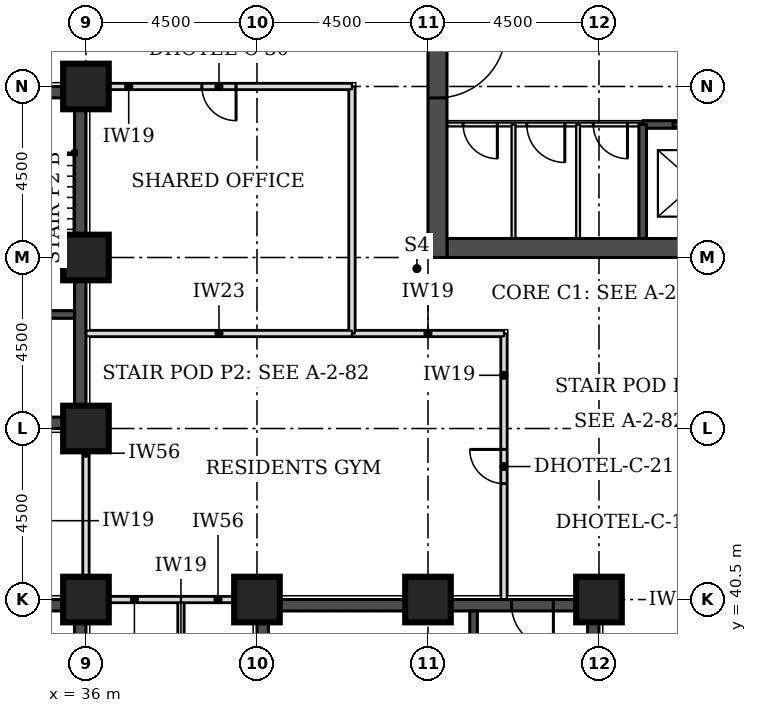
"""IFC4 building model, lengths in metres.
Left out: names, types, materials, properties, quantities, classifications, styles, units other than length and angle.
Written with IfcOpenShell. Run it as: python <this file> out.ifc"""

import sys

from ifc_helpers import new_model, si_unit, direction, frame, frame_2d, origin, origin_2d, place, context, subcontext, project, spatial, rectangle, extrude, element, fill, save


model = new_model("IFC4")
c1 = context("Model", 3, precision=1e-05, world=origin(), true_north=direction((0.0, 1.0)))
c2 = subcontext(c1, "Body", "Model", "MODEL_VIEW")
j1 = project(units=[si_unit("LENGTHUNIT", "METRE"), si_unit("PLANEANGLEUNIT", "RADIAN")], contexts=[c1])
p1 = place(None, origin())
s1 = spatial("IfcSite", under=j1, at=p1, CompositionType="ELEMENT")
p2 = place(p1, origin())
s2 = spatial("IfcBuilding", under=s1, at=p2, CompositionType="ELEMENT")
p3 = place(p2, frame((0.0, 0.0, 56.1)))
s3 = spatial("IfcBuildingStorey", under=s2, at=p3, CompositionType="ELEMENT", Elevation=56.1)
for number, where, z_axis, x_axis in (
    (1, (36.0, 40.5, 0.0), (0.0, 0.0, 1.0), (1.0, 0.0, 0.0)),
    (2, (40.5, 40.5, 0.0), (0.0, 0.0, 1.0), (1.0, 0.0, 0.0)),
    (3, (45.0, 40.5, 0.0), (0.0, 0.0, 1.0), (1.0, 0.0, 0.0)),
    (4, (49.5, 40.5, 0.0), (0.0, 0.0, 1.0), (1.0, 0.0, 0.0)),
    (5, (36.0, 45.0, 0.0), (0.0, 0.0, 1.0), (1.0, 0.0, 0.0)),
    (6, (36.0, 49.5, 0.0), (0.0, 0.0, 1.0), (1.0, 0.0, 0.0)),
    (7, (36.0, 54.0, 0.0), (0.0, 0.0, 1.0), (1.0, 0.0, 0.0)),
):
    element("IfcColumn", number, at=place(p3, frame(where, z_axis=z_axis, x_axis=x_axis)), inside=s3, PredefinedType="COLUMN", context=c2, shape_type="SweptSolid", body=[
        extrude(rectangle(XDim=1.2, YDim=1.2, at=origin_2d()), origin(), (0.0, 0.0, 1.0), 3.3),
    ])
p4 = place(p3, frame((45.5, 49.75, 0.0), z_axis=(0.0, 0.0, 1.0), x_axis=(1.0, 0.0, 0.0)))
e8 = element("IfcWall", 8, at=p4, inside=s3, PredefinedType="SHEAR", context=c2, shape_type="SweptSolid", body=[
    extrude(rectangle(XDim=21.5, YDim=0.5, at=frame_2d((10.75, 0.0))), origin(), (0.0, 0.0, 1.0), 3.3),
])
p5 = place(p3, frame((45.25, 49.5, 0.0), z_axis=(0.0, 0.0, 1.0), x_axis=(0.0, 1.0, 0.0)))
e9 = element("IfcWall", 9, at=p5, inside=s3, PredefinedType="SHEAR", context=c2, shape_type="SweptSolid", body=[
    extrude(rectangle(XDim=22.5, YDim=0.5, at=frame_2d((11.25, 0.0))), origin(), (0.0, 0.0, 1.0), 3.3),
])
p6 = place(p5, frame((4.2, 0.0, 0.0)))
e10 = element("IfcOpeningElement", 10, at=p6, cuts=e9, PredefinedType="OPENING", context=c2, shape_type="SweptSolid", body=[
    extrude(rectangle(XDim=1.8, YDim=2.1, at=frame_2d((0.9, 1.05))), frame((0.0, 0.26, 0.0), z_axis=(0.0, -1.0, 0.0), x_axis=(1.0, 0.0, 0.0)), (0.0, 0.0, 1.0), 0.52),
])
p7 = place(p5, frame((6.9, 0.0, 0.0)))
e11 = element("IfcOpeningElement", 11, at=p7, cuts=e9, PredefinedType="OPENING", context=c2, shape_type="SweptSolid", body=[
    extrude(rectangle(XDim=1.1, YDim=2.1, at=frame_2d((0.55, 1.05))), frame((0.0, 0.26, 0.0), z_axis=(0.0, -1.0, 0.0), x_axis=(1.0, 0.0, 0.0)), (0.0, 0.0, 1.0), 0.52),
])
p8 = place(p5, frame((13.6, 0.0, 0.0)))
e12 = element("IfcOpeningElement", 12, at=p8, cuts=e9, PredefinedType="OPENING", context=c2, shape_type="SweptSolid", body=[
    extrude(rectangle(XDim=1.1, YDim=2.1, at=frame_2d((0.55, 1.05))), frame((0.0, 0.26, 0.0), z_axis=(0.0, -1.0, 0.0), x_axis=(1.0, 0.0, 0.0)), (0.0, 0.0, 1.0), 0.52),
])
p9 = place(p5, frame((16.5, 0.0, 0.0)))
e13 = element("IfcOpeningElement", 13, at=p9, cuts=e9, PredefinedType="OPENING", context=c2, shape_type="SweptSolid", body=[
    extrude(rectangle(XDim=1.8, YDim=2.1, at=frame_2d((0.9, 1.05))), frame((0.0, 0.26, 0.0), z_axis=(0.0, -1.0, 0.0), x_axis=(1.0, 0.0, 0.0)), (0.0, 0.0, 1.0), 0.52),
])
p10 = place(p3, frame((27.3, 45.15, 0.0), z_axis=(0.0, 0.0, 1.0), x_axis=(1.0, 0.0, 0.0)))
e14 = element("IfcWall", 14, at=p10, inside=s3, PredefinedType="SHEAR", context=c2, shape_type="SweptSolid", body=[
    extrude(rectangle(XDim=8.4, YDim=0.3, at=frame_2d((4.2, 0.0))), origin(), (0.0, 0.0, 1.0), 3.3),
])
p11 = place(p10, frame((5.2, 0.0, 0.0)))
e15 = element("IfcOpeningElement", 15, at=p11, cuts=e14, PredefinedType="OPENING", context=c2, shape_type="SweptSolid", body=[
    extrude(rectangle(XDim=1.0, YDim=2.1, at=frame_2d((0.5, 1.05))), frame((0.0, 0.16, 0.0), z_axis=(0.0, -1.0, 0.0), x_axis=(1.0, 0.0, 0.0)), (0.0, 0.0, 1.0), 0.32),
])
p12 = place(p3, frame((27.3, 53.85, 0.0), z_axis=(0.0, 0.0, 1.0), x_axis=(1.0, 0.0, 0.0)))
e16 = element("IfcWall", 16, at=p12, inside=s3, PredefinedType="SHEAR", context=c2, shape_type="SweptSolid", body=[
    extrude(rectangle(XDim=8.4, YDim=0.3, at=frame_2d((4.2, 0.0))), origin(), (0.0, 0.0, 1.0), 3.3),
])
p13 = place(p12, frame((6.4, 0.0, 0.0)))
e17 = element("IfcOpeningElement", 17, at=p13, cuts=e16, PredefinedType="OPENING", context=c2, shape_type="SweptSolid", body=[
    extrude(rectangle(XDim=1.1, YDim=2.1, at=frame_2d((0.55, 1.05))), frame((0.0, 0.16, 0.0), z_axis=(0.0, -1.0, 0.0), x_axis=(1.0, 0.0, 0.0)), (0.0, 0.0, 1.0), 0.32),
])
p14 = place(p3, frame((35.85, 45.0, 0.0), z_axis=(0.0, 0.0, 1.0), x_axis=(0.0, 1.0, 0.0)))
e18 = element("IfcWall", 18, at=p14, inside=s3, PredefinedType="SHEAR", context=c2, shape_type="SweptSolid", body=[
    extrude(rectangle(XDim=9.0, YDim=0.3, at=frame_2d((4.5, 0.0))), origin(), (0.0, 0.0, 1.0), 3.3),
])
p15 = place(p3, frame((40.8, 40.35, 0.0), z_axis=(0.0, 0.0, 1.0), x_axis=(1.0, 0.0, 0.0)))
e19 = element("IfcWall", 19, at=p15, inside=s3, PredefinedType="SHEAR", context=c2, shape_type="SweptSolid", body=[
    extrude(rectangle(XDim=8.4, YDim=0.3, at=frame_2d((4.2, 0.0))), origin(), (0.0, 0.0, 1.0), 3.3),
])
p16 = place(p15, frame((6.4, 0.0, 0.0)))
e20 = element("IfcOpeningElement", 20, at=p16, cuts=e19, PredefinedType="OPENING", context=c2, shape_type="SweptSolid", body=[
    extrude(rectangle(XDim=1.1, YDim=2.1, at=frame_2d((0.55, 1.05))), frame((0.0, 0.16, 0.0), z_axis=(0.0, -1.0, 0.0), x_axis=(1.0, 0.0, 0.0)), (0.0, 0.0, 1.0), 0.32),
])
p17 = place(p3, frame((40.65, 31.5, 0.0), z_axis=(0.0, 0.0, 1.0), x_axis=(0.0, 1.0, 0.0)))
e21 = element("IfcWall", 21, at=p17, inside=s3, PredefinedType="SHEAR", context=c2, shape_type="SweptSolid", body=[
    extrude(rectangle(XDim=9.0, YDim=0.3, at=frame_2d((4.5, 0.0))), origin(), (0.0, 0.0, 1.0), 3.3),
])
p18 = place(p17, frame((0.4, 0.0, 0.0)))
e22 = element("IfcOpeningElement", 22, at=p18, cuts=e21, PredefinedType="OPENING", context=c2, shape_type="SweptSolid", body=[
    extrude(rectangle(XDim=1.1, YDim=2.1, at=frame_2d((0.55, 1.05))), frame((0.0, 0.16, 0.0), z_axis=(0.0, -1.0, 0.0), x_axis=(1.0, 0.0, 0.0)), (0.0, 0.0, 1.0), 0.32),
])
p19 = place(p3, frame((49.35, 31.5, 0.0), z_axis=(0.0, 0.0, 1.0), x_axis=(0.0, 1.0, 0.0)))
e23 = element("IfcWall", 23, at=p19, inside=s3, PredefinedType="SHEAR", context=c2, shape_type="SweptSolid", body=[
    extrude(rectangle(XDim=9.0, YDim=0.3, at=frame_2d((4.5, 0.0))), origin(), (0.0, 0.0, 1.0), 3.3),
])
p20 = place(p3, frame((27.3, 40.35, 0.0), z_axis=(0.0, 0.0, 1.0), x_axis=(1.0, 0.0, 0.0)))
e24 = element("IfcWall", 24, at=p20, inside=s3, PredefinedType="SHEAR", context=c2, shape_type="SweptSolid", body=[
    extrude(rectangle(XDim=8.4, YDim=0.3, at=frame_2d((4.2, 0.0))), origin(), (0.0, 0.0, 1.0), 3.3),
])
p21 = place(p20, frame((6.4, 0.0, 0.0)))
e25 = element("IfcOpeningElement", 25, at=p21, cuts=e24, PredefinedType="OPENING", context=c2, shape_type="SweptSolid", body=[
    extrude(rectangle(XDim=1.1, YDim=2.1, at=frame_2d((0.55, 1.05))), frame((0.0, 0.16, 0.0), z_axis=(0.0, -1.0, 0.0), x_axis=(1.0, 0.0, 0.0)), (0.0, 0.0, 1.0), 0.32),
])
p22 = place(p3, frame((35.85, 31.5, 0.0), z_axis=(0.0, 0.0, 1.0), x_axis=(0.0, 1.0, 0.0)))
e26 = element("IfcWall", 26, at=p22, inside=s3, PredefinedType="SHEAR", context=c2, shape_type="SweptSolid", body=[
    extrude(rectangle(XDim=9.0, YDim=0.3, at=frame_2d((4.5, 0.0))), origin(), (0.0, 0.0, 1.0), 3.3),
])
p23 = place(p3, frame((38.5, 27.15, 0.0), z_axis=(0.0, 0.0, 1.0), x_axis=(0.0, 1.0, 0.0)))
e27 = element("IfcWall", 27, at=p23, inside=s3, PredefinedType="PARTITIONING", context=c2, shape_type="SweptSolid", body=[
    extrude(rectangle(XDim=13.35, YDim=0.15, at=frame_2d((6.675, 0.0))), origin(), (0.0, 0.0, 1.0), 3.08),
])
p24 = place(p23, frame((6.225, 0.0, 0.0)))
e28 = element("IfcOpeningElement", 28, at=p24, cuts=e27, PredefinedType="OPENING", context=c2, shape_type="SweptSolid", body=[
    extrude(rectangle(XDim=0.9, YDim=2.1, at=frame_2d((0.45, 1.05))), frame((0.0, 0.085, 0.0), z_axis=(0.0, -1.0, 0.0), x_axis=(1.0, 0.0, 0.0)), (0.0, 0.0, 1.0), 0.17),
])
p25 = place(p3, frame((38.5, 40.5, 0.0), z_axis=(0.0, 0.0, 1.0), x_axis=(1.0, 0.0, 0.0)))
e29 = element("IfcWall", 29, at=p25, inside=s3, PredefinedType="PARTITIONING", context=c2, shape_type="SweptSolid", body=[
    extrude(rectangle(XDim=1.95, YDim=0.15, at=frame_2d((0.975, 0.0))), origin(), (0.0, 0.0, 1.0), 2.33),
])
p26 = place(p3, frame((36.0, 40.55, 0.0), z_axis=(0.0, 0.0, 1.0), x_axis=(0.0, 1.0, 0.0)))
e30 = element("IfcWall", 30, at=p26, inside=s3, PredefinedType="PARTITIONING", context=c2, shape_type="SweptSolid", body=[
    extrude(rectangle(XDim=4.4, YDim=0.15, at=frame_2d((2.2, 0.0))), origin(), (0.0, 0.0, 1.0), 2.33),
])
p27 = place(p3, frame((47.0, 40.5, 0.0), z_axis=(0.0, 0.0, 1.0), x_axis=(0.0, 1.0, 0.0)))
e31 = element("IfcWall", 31, at=p27, inside=s3, PredefinedType="PARTITIONING", context=c2, shape_type="SweptSolid", body=[
    extrude(rectangle(XDim=7.0, YDim=0.15, at=frame_2d((3.5, 0.0))), origin(), (0.0, 0.0, 1.0), 3.08),
])
p28 = place(p27, frame((3.05, 0.0, 0.0)))
e32 = element("IfcOpeningElement", 32, at=p28, cuts=e31, PredefinedType="OPENING", context=c2, shape_type="SweptSolid", body=[
    extrude(rectangle(XDim=0.9, YDim=2.1, at=frame_2d((0.45, 1.05))), frame((0.0, 0.085, 0.0), z_axis=(0.0, -1.0, 0.0), x_axis=(1.0, 0.0, 0.0)), (0.0, 0.0, 1.0), 0.17),
])
p29 = place(p3, frame((43.0, 47.5, 0.0), z_axis=(0.0, 0.0, 1.0), x_axis=(1.0, 0.0, 0.0)))
e33 = element("IfcWall", 33, at=p29, inside=s3, PredefinedType="PARTITIONING", context=c2, shape_type="SweptSolid", body=[
    extrude(rectangle(XDim=4.0, YDim=0.15, at=frame_2d((2.0, 0.0))), origin(), (0.0, 0.0, 1.0), 3.08),
])
p30 = place(p3, frame((43.0, 47.5, 0.0), z_axis=(0.0, 0.0, 1.0), x_axis=(0.0, 1.0, 0.0)))
e34 = element("IfcWall", 34, at=p30, inside=s3, PredefinedType="PARTITIONING", context=c2, shape_type="SweptSolid", body=[
    extrude(rectangle(XDim=6.5, YDim=0.15, at=frame_2d((3.25, 0.0))), origin(), (0.0, 0.0, 1.0), 3.08),
])
p31 = place(p3, frame((36.05, 54.0, 0.0), z_axis=(0.0, 0.0, 1.0), x_axis=(1.0, 0.0, 0.0)))
e35 = element("IfcWall", 35, at=p31, inside=s3, PredefinedType="PARTITIONING", context=c2, shape_type="SweptSolid", body=[
    extrude(rectangle(XDim=6.95, YDim=0.15, at=frame_2d((3.475, 0.0))), origin(), (0.0, 0.0, 1.0), 3.08),
])
p32 = place(p31, frame((3.0, 0.0, 0.0)))
e36 = element("IfcOpeningElement", 36, at=p32, cuts=e35, PredefinedType="OPENING", context=c2, shape_type="SweptSolid", body=[
    extrude(rectangle(XDim=0.9, YDim=2.1, at=frame_2d((0.45, 1.05))), frame((0.0, 0.085, 0.0), z_axis=(0.0, -1.0, 0.0), x_axis=(1.0, 0.0, 0.0)), (0.0, 0.0, 1.0), 0.17),
])
p33 = place(p3, frame((36.05, 40.5, 0.0), z_axis=(0.0, 0.0, 1.0), x_axis=(1.0, 0.0, 0.0)))
e37 = element("IfcWall", 37, at=p33, inside=s3, PredefinedType="PARTITIONING", context=c2, shape_type="SweptSolid", body=[
    extrude(rectangle(XDim=2.45, YDim=0.15, at=frame_2d((1.225, 0.0))), origin(), (0.0, 0.0, 1.0), 2.33),
])
p34 = place(p3, frame((36.0, 47.5, 0.0), z_axis=(0.0, 0.0, 1.0), x_axis=(1.0, 0.0, 0.0)))
e38 = element("IfcWall", 38, at=p34, inside=s3, PredefinedType="PARTITIONING", context=c2, shape_type="SweptSolid", body=[
    extrude(rectangle(XDim=7.0, YDim=0.15, at=frame_2d((3.5, 0.0))), origin(), (0.0, 0.0, 1.0), 3.08),
])
p35 = place(p3, frame((45.5, 53.0, 0.0), z_axis=(0.0, 0.0, 1.0), x_axis=(1.0, 0.0, 0.0)))
e39 = element("IfcWall", 39, at=p35, inside=s3, PredefinedType="PARTITIONING", context=c2, shape_type="SweptSolid", body=[
    extrude(rectangle(XDim=5.15, YDim=0.1, at=frame_2d((2.575, 0.0))), origin(), (0.0, 0.0, 1.0), 3.08),
])
p36 = place(p35, frame((0.426, 0.0, 0.0)))
e40 = element("IfcOpeningElement", 40, at=p36, cuts=e39, PredefinedType="OPENING", context=c2, shape_type="SweptSolid", body=[
    extrude(rectangle(XDim=0.9, YDim=2.1, at=frame_2d((0.45, 1.05))), frame((0.0, 0.06, 0.0), z_axis=(0.0, -1.0, 0.0), x_axis=(1.0, 0.0, 0.0)), (0.0, 0.0, 1.0), 0.12),
])
p37 = place(p35, frame((2.101, 0.0, 0.0)))
e41 = element("IfcOpeningElement", 41, at=p37, cuts=e39, PredefinedType="OPENING", context=c2, shape_type="SweptSolid", body=[
    extrude(rectangle(XDim=1.0, YDim=2.1, at=frame_2d((0.5, 1.05))), frame((0.0, 0.06, 0.0), z_axis=(0.0, -1.0, 0.0), x_axis=(1.0, 0.0, 0.0)), (0.0, 0.0, 1.0), 0.12),
])
p38 = place(p35, frame((3.85, 0.0, 0.0)))
e42 = element("IfcOpeningElement", 42, at=p38, cuts=e39, PredefinedType="OPENING", context=c2, shape_type="SweptSolid", body=[
    extrude(rectangle(XDim=0.9, YDim=2.1, at=frame_2d((0.45, 1.05))), frame((0.0, 0.06, 0.0), z_axis=(0.0, -1.0, 0.0), x_axis=(1.0, 0.0, 0.0)), (0.0, 0.0, 1.0), 0.12),
])
p39 = place(p3, frame((50.65, 53.0, 0.0), z_axis=(0.0, 0.0, 1.0), x_axis=(1.0, 0.0, 0.0)))
e43 = element("IfcWall", 43, at=p39, inside=s3, PredefinedType="SOLIDWALL", context=c2, shape_type="SweptSolid", body=[
    extrude(rectangle(XDim=11.2, YDim=0.2, at=frame_2d((5.6, 0.0))), origin(), (0.0, 0.0, 1.0), 3.08),
])
p40 = place(p39, frame((0.8, 0.0, 0.0)))
e44 = element("IfcOpeningElement", 44, at=p40, cuts=e43, PredefinedType="OPENING", context=c2, shape_type="SweptSolid", body=[
    extrude(rectangle(XDim=1.2, YDim=2.1, at=frame_2d((0.6, 1.05))), frame((0.0, 0.11, 0.0), z_axis=(0.0, -1.0, 0.0), x_axis=(1.0, 0.0, 0.0)), (0.0, 0.0, 1.0), 0.22),
])
p41 = place(p39, frame((3.6, 0.0, 0.0)))
e45 = element("IfcOpeningElement", 45, at=p41, cuts=e43, PredefinedType="OPENING", context=c2, shape_type="SweptSolid", body=[
    extrude(rectangle(XDim=1.2, YDim=2.1, at=frame_2d((0.6, 1.05))), frame((0.0, 0.11, 0.0), z_axis=(0.0, -1.0, 0.0), x_axis=(1.0, 0.0, 0.0)), (0.0, 0.0, 1.0), 0.22),
])
p42 = place(p39, frame((6.4, 0.0, 0.0)))
e46 = element("IfcOpeningElement", 46, at=p42, cuts=e43, PredefinedType="OPENING", context=c2, shape_type="SweptSolid", body=[
    extrude(rectangle(XDim=1.2, YDim=2.1, at=frame_2d((0.6, 1.05))), frame((0.0, 0.11, 0.0), z_axis=(0.0, -1.0, 0.0), x_axis=(1.0, 0.0, 0.0)), (0.0, 0.0, 1.0), 0.22),
])
p43 = place(p39, frame((9.2, 0.0, 0.0)))
e47 = element("IfcOpeningElement", 47, at=p43, cuts=e43, PredefinedType="OPENING", context=c2, shape_type="SweptSolid", body=[
    extrude(rectangle(XDim=1.2, YDim=2.1, at=frame_2d((0.6, 1.05))), frame((0.0, 0.11, 0.0), z_axis=(0.0, -1.0, 0.0), x_axis=(1.0, 0.0, 0.0)), (0.0, 0.0, 1.0), 0.22),
])
for number, where, z_axis, x_axis in (
    (48, (47.251, 50.0, 0.0), (0.0, 0.0, 1.0), (0.0, 1.0, 0.0)),
    (49, (48.95, 50.0, 0.0), (0.0, 0.0, 1.0), (0.0, 1.0, 0.0)),
):
    element("IfcWall", number, at=place(p3, frame(where, z_axis=z_axis, x_axis=x_axis)), inside=s3, PredefinedType="PARTITIONING", context=c2, shape_type="SweptSolid", body=[
        extrude(rectangle(XDim=3.0, YDim=0.1, at=frame_2d((1.5, 0.0))), origin(), (0.0, 0.0, 1.0), 3.08),
    ])
for number, where, z_axis, x_axis in (
    (50, (50.65, 50.0, 0.0), (0.0, 0.0, 1.0), (0.0, 1.0, 0.0)),
    (51, (32.7, 48.0, 0.0), (0.0, 0.0, 1.0), (1.0, 0.0, 0.0)),
):
    element("IfcWall", number, at=place(p3, frame(where, z_axis=z_axis, x_axis=x_axis)), inside=s3, PredefinedType="SOLIDWALL", context=c2, shape_type="SweptSolid", body=[
        extrude(rectangle(XDim=3.0, YDim=0.2, at=frame_2d((1.5, 0.0))), origin(), (0.0, 0.0, 1.0), 3.08),
    ])
p44 = place(p3, frame((46.2, 34.5, 0.0), z_axis=(0.0, 0.0, 1.0), x_axis=(0.0, 1.0, 0.0)))
e52 = element("IfcWall", 52, at=p44, inside=s3, PredefinedType="SOLIDWALL", context=c2, shape_type="SweptSolid", body=[
    extrude(rectangle(XDim=5.7, YDim=0.2, at=frame_2d((2.85, 0.0))), origin(), (0.0, 0.0, 1.0), 3.08),
])
p45 = place(p32, frame((0.9, 0.0, 0.0), z_axis=(0.0, 0.0, 1.0), x_axis=(-1.0, 0.0, 0.0)))
e53 = element("IfcDoor", 53, at=p45, inside=s3, OperationType="SINGLE_SWING_LEFT", PredefinedType="DOOR", context=c2, shape_type="SweptSolid", body=[
    extrude(rectangle(XDim=0.9, YDim=2.1, at=frame_2d((0.45, 1.05))), frame((0.0, 0.025, 0.0), z_axis=(0.0, -1.0, 0.0), x_axis=(1.0, 0.0, 0.0)), (0.0, 0.0, 1.0), 0.05),
])
fill(e36, e53)
p46 = place(p28, origin())
e54 = element("IfcDoor", 54, at=p46, inside=s3, OperationType="SINGLE_SWING_RIGHT", PredefinedType="DOOR", context=c2, shape_type="SweptSolid", body=[
    extrude(rectangle(XDim=0.9, YDim=2.1, at=frame_2d((0.45, 1.05))), frame((0.0, 0.025, 0.0), z_axis=(0.0, -1.0, 0.0), x_axis=(1.0, 0.0, 0.0)), (0.0, 0.0, 1.0), 0.05),
])
fill(e32, e54)
p47 = place(p40, origin())
e55 = element("IfcDoor", 55, at=p47, inside=s3, OperationType="DOUBLE_DOOR_SLIDING", PredefinedType="DOOR", context=c2, shape_type="SweptSolid", body=[
    extrude(rectangle(XDim=1.2, YDim=2.1, at=frame_2d((0.6, 1.05))), frame((0.0, 0.025, 0.0), z_axis=(0.0, -1.0, 0.0), x_axis=(1.0, 0.0, 0.0)), (0.0, 0.0, 1.0), 0.05),
])
fill(e44, e55)
p48 = place(p6, frame((1.8, 0.0, 0.0), z_axis=(0.0, 0.0, 1.0), x_axis=(-1.0, 0.0, 0.0)))
e56 = element("IfcDoor", 56, at=p48, inside=s3, OperationType="SINGLE_SWING_LEFT", PredefinedType="DOOR", context=c2, shape_type="SweptSolid", body=[
    extrude(rectangle(XDim=1.8, YDim=2.1, at=frame_2d((0.9, 1.05))), frame((0.0, 0.025, 0.0), z_axis=(0.0, -1.0, 0.0), x_axis=(1.0, 0.0, 0.0)), (0.0, 0.0, 1.0), 0.05),
])
fill(e10, e56)
p49 = place(p36, frame((0.9, 0.0, 0.0), z_axis=(0.0, 0.0, 1.0), x_axis=(-1.0, 0.0, 0.0)))
e57 = element("IfcDoor", 57, at=p49, inside=s3, OperationType="SINGLE_SWING_LEFT", PredefinedType="DOOR", context=c2, shape_type="SweptSolid", body=[
    extrude(rectangle(XDim=0.9, YDim=2.1, at=frame_2d((0.45, 1.05))), frame((0.0, 0.025, 0.0), z_axis=(0.0, -1.0, 0.0), x_axis=(1.0, 0.0, 0.0)), (0.0, 0.0, 1.0), 0.05),
])
fill(e40, e57)
p50 = place(p37, frame((1.0, 0.0, 0.0), z_axis=(0.0, 0.0, 1.0), x_axis=(-1.0, 0.0, 0.0)))
e58 = element("IfcDoor", 58, at=p50, inside=s3, OperationType="SINGLE_SWING_LEFT", PredefinedType="DOOR", context=c2, shape_type="SweptSolid", body=[
    extrude(rectangle(XDim=1.0, YDim=2.1, at=frame_2d((0.5, 1.05))), frame((0.0, 0.025, 0.0), z_axis=(0.0, -1.0, 0.0), x_axis=(1.0, 0.0, 0.0)), (0.0, 0.0, 1.0), 0.05),
])
fill(e41, e58)
p51 = place(p38, frame((0.9, 0.0, 0.0), z_axis=(0.0, 0.0, 1.0), x_axis=(-1.0, 0.0, 0.0)))
e59 = element("IfcDoor", 59, at=p51, inside=s3, OperationType="SINGLE_SWING_LEFT", PredefinedType="DOOR", context=c2, shape_type="SweptSolid", body=[
    extrude(rectangle(XDim=0.9, YDim=2.1, at=frame_2d((0.45, 1.05))), frame((0.0, 0.025, 0.0), z_axis=(0.0, -1.0, 0.0), x_axis=(1.0, 0.0, 0.0)), (0.0, 0.0, 1.0), 0.05),
])
fill(e42, e59)
p52 = place(p16, frame((1.1, 0.0, 0.0), z_axis=(0.0, 0.0, 1.0), x_axis=(-1.0, 0.0, 0.0)))
e60 = element("IfcDoor", 60, at=p52, inside=s3, OperationType="SINGLE_SWING_LEFT", PredefinedType="DOOR", context=c2, shape_type="SweptSolid", body=[
    extrude(rectangle(XDim=1.1, YDim=2.1, at=frame_2d((0.55, 1.05))), frame((0.0, 0.025, 0.0), z_axis=(0.0, -1.0, 0.0), x_axis=(1.0, 0.0, 0.0)), (0.0, 0.0, 1.0), 0.05),
])
fill(e20, e60)
save(model, sys.argv[1])
